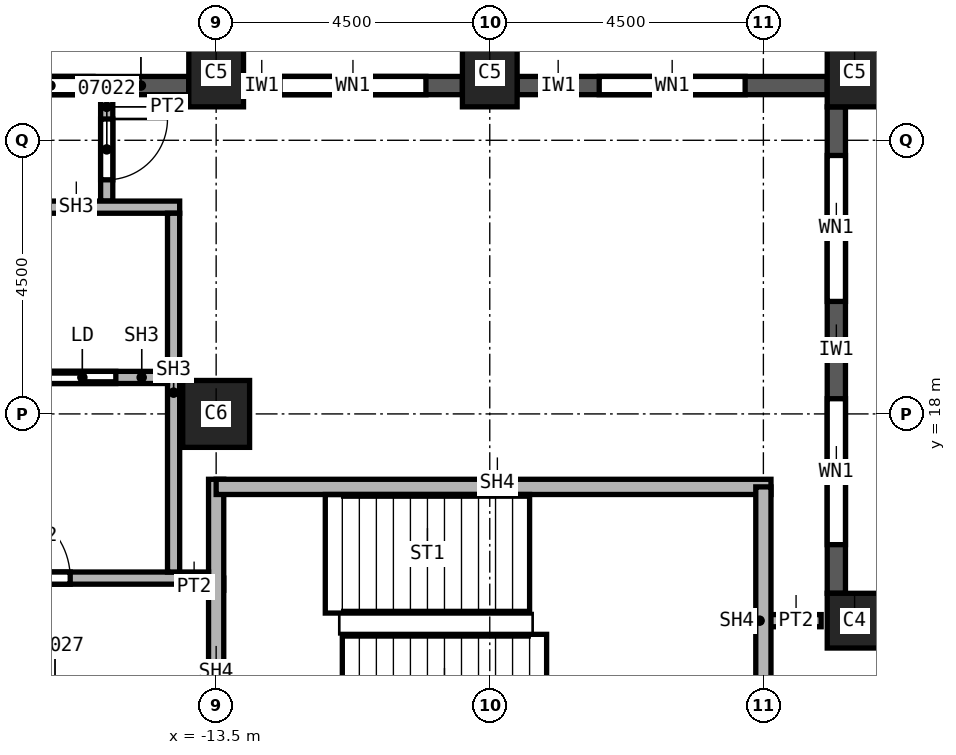
"""IFC4 building model, lengths in metres.
Left out: names, types, materials, properties, quantities, classifications, styles, units other than length and angle.
Written with IfcOpenShell. Run it as: python <this file> out.ifc"""

import sys

from ifc_helpers import new_model, si_unit, direction, frame, frame_2d, origin, origin_2d, place, context, subcontext, project, spatial, rectangle, extrude, element, fill, save


model = new_model("IFC4")
c1 = context("Model", 3, precision=1e-05, world=origin(), true_north=direction((0.0, 1.0)))
c2 = subcontext(c1, "Body", "Model", "MODEL_VIEW")
j1 = project(units=[si_unit("LENGTHUNIT", "METRE"), si_unit("PLANEANGLEUNIT", "RADIAN")], contexts=[c1])
p1 = place(None, origin())
s1 = spatial("IfcSite", under=j1, at=p1, CompositionType="ELEMENT")
p2 = place(p1, origin())
s2 = spatial("IfcBuilding", under=s1, at=p2, CompositionType="ELEMENT")
p3 = place(p2, frame((0.0, 0.0, 138.0)))
s3 = spatial("IfcBuildingStorey", under=s2, at=p3, CompositionType="ELEMENT", Elevation=138.0)
p4 = place(p3, frame((-13.5, 18.0, 0.0), z_axis=(0.0, 0.0, 1.0), x_axis=(1.0, 0.0, 0.0)))
e1 = element("IfcColumn", 1, at=p4, inside=s3, PredefinedType="COLUMN", context=c2, shape_type="SweptSolid", body=[
    extrude(rectangle(XDim=1.1, YDim=1.1, at=origin_2d()), origin(), (0.0, 0.0, 1.0), 3.7),
])
for number, where, z_axis, x_axis in (
    (2, (-3.0, 23.6, 0.0), (0.0, 0.0, 1.0), (1.0, 0.0, 0.0)),
    (3, (-9.0, 23.6, 0.0), (0.0, 0.0, 1.0), (1.0, 0.0, 0.0)),
    (4, (-13.5, 23.6, 0.0), (0.0, 0.0, 1.0), (1.0, 0.0, 0.0)),
):
    element("IfcColumn", number, at=place(p3, frame(where, z_axis=z_axis, x_axis=x_axis)), inside=s3, PredefinedType="COLUMN", context=c2, shape_type="SweptSolid", body=[
        extrude(rectangle(XDim=0.9, YDim=1.1, at=origin_2d()), origin(), (0.0, 0.0, 1.0), 3.7),
    ])
p5 = place(p3, frame((-3.0, 14.6, 0.0), z_axis=(0.0, 0.0, 1.0), x_axis=(1.0, 0.0, 0.0)))
e5 = element("IfcColumn", 5, at=p5, inside=s3, PredefinedType="COLUMN", context=c2, shape_type="SweptSolid", body=[
    extrude(rectangle(XDim=0.9, YDim=0.9, at=origin_2d()), origin(), (0.0, 0.0, 1.0), 3.7),
])
p6 = place(p3, frame((-3.3, 15.05, 0.0), z_axis=(0.0, 0.0, 1.0), x_axis=(0.0, 1.0, 0.0)))
e6 = element("IfcWall", 6, at=p6, inside=s3, PredefinedType="SOLIDWALL", context=c2, shape_type="SweptSolid", body=[
    extrude(rectangle(XDim=8.0, YDim=0.3, at=frame_2d((4.0, 0.0))), origin(), (0.0, 0.0, 1.0), 3.1),
])
p7 = place(p6, frame((0.8, 0.0, 0.8)))
e7 = element("IfcOpeningElement", 7, at=p7, cuts=e6, PredefinedType="OPENING", context=c2, shape_type="SweptSolid", body=[
    extrude(rectangle(XDim=2.4, YDim=1.95, at=frame_2d((1.2, 0.975))), frame((0.0, 0.15, 0.0), z_axis=(0.0, -1.0, 0.0), x_axis=(1.0, 0.0, 0.0)), (0.0, 0.0, 1.0), 0.3),
])
p8 = place(p6, frame((4.8, 0.0, 0.8)))
e8 = element("IfcOpeningElement", 8, at=p8, cuts=e6, PredefinedType="OPENING", context=c2, shape_type="SweptSolid", body=[
    extrude(rectangle(XDim=2.4, YDim=1.95, at=frame_2d((1.2, 0.975))), frame((0.0, 0.15, 0.0), z_axis=(0.0, -1.0, 0.0), x_axis=(1.0, 0.0, 0.0)), (0.0, 0.0, 1.0), 0.3),
])
p9 = place(p3, frame((-3.45, 23.4, 0.0), z_axis=(0.0, 0.0, 1.0), x_axis=(-1.0, 0.0, 0.0)))
e9 = element("IfcWall", 9, at=p9, inside=s3, PredefinedType="SOLIDWALL", context=c2, shape_type="SweptSolid", body=[
    extrude(rectangle(XDim=5.1, YDim=0.3, at=frame_2d((2.55, 0.0))), origin(), (0.0, 0.0, 1.0), 3.1),
])
p10 = place(p9, frame((1.35, 0.0, 0.8)))
e10 = element("IfcOpeningElement", 10, at=p10, cuts=e9, PredefinedType="OPENING", context=c2, shape_type="SweptSolid", body=[
    extrude(rectangle(XDim=2.4, YDim=1.95, at=frame_2d((1.2, 0.975))), frame((0.0, 0.15, 0.0), z_axis=(0.0, -1.0, 0.0), x_axis=(1.0, 0.0, 0.0)), (0.0, 0.0, 1.0), 0.3),
])
p11 = place(p3, frame((-9.45, 23.4, 0.0), z_axis=(0.0, 0.0, 1.0), x_axis=(-1.0, 0.0, 0.0)))
e11 = element("IfcWall", 11, at=p11, inside=s3, PredefinedType="SOLIDWALL", context=c2, shape_type="SweptSolid", body=[
    extrude(rectangle(XDim=3.6, YDim=0.3, at=frame_2d((1.8, 0.0))), origin(), (0.0, 0.0, 1.0), 3.1),
])
p12 = place(p11, frame((0.6, 0.0, 0.8)))
e12 = element("IfcOpeningElement", 12, at=p12, cuts=e11, PredefinedType="OPENING", context=c2, shape_type="SweptSolid", body=[
    extrude(rectangle(XDim=2.4, YDim=1.95, at=frame_2d((1.2, 0.975))), frame((0.0, 0.15, 0.0), z_axis=(0.0, -1.0, 0.0), x_axis=(1.0, 0.0, 0.0)), (0.0, 0.0, 1.0), 0.3),
])
p13 = place(p3, frame((-13.95, 23.4, 0.0), z_axis=(0.0, 0.0, 1.0), x_axis=(-1.0, 0.0, 0.0)))
e13 = element("IfcWall", 13, at=p13, inside=s3, PredefinedType="SOLIDWALL", context=c2, shape_type="SweptSolid", body=[
    extrude(rectangle(XDim=3.6, YDim=0.3, at=frame_2d((1.8, 0.0))), origin(), (0.0, 0.0, 1.0), 3.1),
])
p14 = place(p13, frame((1.575, 0.0, 0.8)))
e14 = element("IfcOpeningElement", 14, at=p14, cuts=e13, PredefinedType="OPENING", context=c2, shape_type="SweptSolid", body=[
    extrude(rectangle(XDim=1.4, YDim=1.95, at=frame_2d((0.7, 0.975))), frame((0.0, 0.15, 0.0), z_axis=(0.0, -1.0, 0.0), x_axis=(1.0, 0.0, 0.0)), (0.0, 0.0, 1.0), 0.3),
])
p15 = place(p3, frame((-15.3, 23.25, 0.0), z_axis=(0.0, 0.0, 1.0), x_axis=(0.0, -1.0, 0.0)))
e15 = element("IfcWall", 15, at=p15, inside=s3, PredefinedType="PARTITIONING", context=c2, shape_type="SweptSolid", body=[
    extrude(rectangle(XDim=1.75, YDim=0.2, at=frame_2d((0.875, 0.0))), origin(), (0.0, 0.0, 1.0), 3.7),
])
p16 = place(p15, frame((0.4, 0.0, 0.0)))
e16 = element("IfcOpeningElement", 16, at=p16, cuts=e15, PredefinedType="OPENING", context=c2, shape_type="SweptSolid", body=[
    extrude(rectangle(XDim=1.0, YDim=2.1, at=frame_2d((0.5, 1.05))), frame((0.0, 0.1, 0.0), z_axis=(0.0, -1.0, 0.0), x_axis=(1.0, 0.0, 0.0)), (0.0, 0.0, 1.0), 0.2),
])
p17 = place(p3, frame((-14.1, 15.2, 0.0), z_axis=(0.0, 0.0, 1.0), x_axis=(1.0, 0.0, 0.0)))
e17 = element("IfcWall", 17, at=p17, inside=s3, PredefinedType="PARTITIONING", context=c2, shape_type="SweptSolid", body=[
    extrude(rectangle(XDim=0.725, YDim=0.2, at=frame_2d((0.363, 0.0))), origin(), (0.0, 0.0, 1.0), 3.7),
])
p18 = place(p3, frame((-4.5, 14.6, 0.0), z_axis=(0.0, 0.0, 1.0), x_axis=(1.0, 0.0, 0.0)))
e18 = element("IfcWall", 18, at=p18, inside=s3, PredefinedType="PARTITIONING", context=c2, shape_type="SweptSolid", body=[
    extrude(rectangle(XDim=0.95, YDim=0.2, at=frame_2d((0.475, 0.0))), origin(), (0.0, 0.0, 1.0), 3.7),
])
p19 = place(p3, frame((-13.5, 12.175, 0.0), z_axis=(0.0, 0.0, 1.0), x_axis=(0.0, 1.0, 0.0)))
e19 = element("IfcWall", 19, at=p19, inside=s3, PredefinedType="SOLIDWALL", context=c2, shape_type="SweptSolid", body=[
    extrude(rectangle(XDim=4.75, YDim=0.25, at=frame_2d((2.375, 0.0))), origin(), (0.0, 0.0, 1.0), 3.7),
])
p20 = place(p3, frame((-13.5, 16.8, 0.0), z_axis=(0.0, 0.0, 1.0), x_axis=(1.0, 0.0, 0.0)))
e20 = element("IfcWall", 20, at=p20, inside=s3, PredefinedType="SOLIDWALL", context=c2, shape_type="SweptSolid", body=[
    extrude(rectangle(XDim=9.125, YDim=0.25, at=frame_2d((4.562, 0.0))), origin(), (0.0, 0.0, 1.0), 3.7),
])
p21 = place(p3, frame((-4.5, 16.8, 0.0), z_axis=(0.0, 0.0, 1.0), x_axis=(0.0, -1.0, 0.0)))
e21 = element("IfcWall", 21, at=p21, inside=s3, PredefinedType="SOLIDWALL", context=c2, shape_type="SweptSolid", body=[
    extrude(rectangle(XDim=4.5, YDim=0.25, at=frame_2d((2.25, 0.0))), origin(), (0.0, 0.0, 1.0), 3.7),
])
p22 = place(p3, frame((-21.9, 15.3, 0.0), z_axis=(0.0, 0.0, 1.0), x_axis=(1.0, 0.0, 0.0)))
e22 = element("IfcWall", 22, at=p22, inside=s3, PredefinedType="SOLIDWALL", context=c2, shape_type="SweptSolid", body=[
    extrude(rectangle(XDim=8.275, YDim=0.2, at=frame_2d((4.137, 0.0))), origin(), (0.0, 0.0, 1.0), 3.7),
])
p23 = place(p22, frame((4.8, 0.0, 0.0)))
e23 = element("IfcOpeningElement", 23, at=p23, cuts=e22, PredefinedType="OPENING", context=c2, shape_type="SweptSolid", body=[
    extrude(rectangle(XDim=1.2, YDim=2.1, at=frame_2d((0.6, 1.05))), frame((0.0, 0.1, 0.0), z_axis=(0.0, -1.0, 0.0), x_axis=(1.0, 0.0, 0.0)), (0.0, 0.0, 1.0), 0.2),
])
p24 = place(p3, frame((-21.9, 21.4, 0.0), z_axis=(0.0, 0.0, 1.0), x_axis=(1.0, 0.0, 0.0)))
e24 = element("IfcWall", 24, at=p24, inside=s3, PredefinedType="SOLIDWALL", context=c2, shape_type="SweptSolid", body=[
    extrude(rectangle(XDim=7.8, YDim=0.2, at=frame_2d((3.9, 0.0))), origin(), (0.0, 0.0, 1.0), 3.7),
])
p25 = place(p24, frame((3.2, 0.0, 0.0)))
e25 = element("IfcOpeningElement", 25, at=p25, cuts=e24, PredefinedType="OPENING", context=c2, shape_type="SweptSolid", body=[
    extrude(rectangle(XDim=1.2, YDim=2.1, at=frame_2d((0.6, 1.05))), frame((0.0, 0.1, 0.0), z_axis=(0.0, -1.0, 0.0), x_axis=(1.0, 0.0, 0.0)), (0.0, 0.0, 1.0), 0.2),
])
p26 = place(p3, frame((-14.2, 15.4, 0.0), z_axis=(0.0, 0.0, 1.0), x_axis=(0.0, 1.0, 0.0)))
e26 = element("IfcWall", 26, at=p26, inside=s3, PredefinedType="SOLIDWALL", context=c2, shape_type="SweptSolid", body=[
    extrude(rectangle(XDim=5.9, YDim=0.2, at=frame_2d((2.95, 0.0))), origin(), (0.0, 0.0, 1.0), 3.7),
])
p27 = place(p3, frame((-17.1, 18.6, 0.0), z_axis=(0.0, 0.0, 1.0), x_axis=(1.0, 0.0, 0.0)))
e27 = element("IfcWall", 27, at=p27, inside=s3, PredefinedType="SOLIDWALL", context=c2, shape_type="SweptSolid", body=[
    extrude(rectangle(XDim=2.8, YDim=0.2, at=frame_2d((1.4, 0.0))), origin(), (0.0, 0.0, 1.0), 3.7),
])
p28 = place(p27, frame((0.85, 0.0, 0.0)))
e28 = element("IfcOpeningElement", 28, at=p28, cuts=e27, PredefinedType="OPENING", context=c2, shape_type="SweptSolid", body=[
    extrude(rectangle(XDim=1.1, YDim=2.1, at=frame_2d((0.55, 1.05))), frame((0.0, 0.1, 0.0), z_axis=(0.0, -1.0, 0.0), x_axis=(1.0, 0.0, 0.0)), (0.0, 0.0, 1.0), 0.2),
])
p29 = place(p7, origin())
e29 = element("IfcWindow", 29, at=p29, inside=s3, PartitioningType="SINGLE_PANEL", PredefinedType="WINDOW", context=c2, shape_type="SweptSolid", body=[
    extrude(rectangle(XDim=2.4, YDim=1.95, at=frame_2d((1.2, 0.975))), frame((0.0, 0.03, 0.0), z_axis=(0.0, -1.0, 0.0), x_axis=(1.0, 0.0, 0.0)), (0.0, 0.0, 1.0), 0.06),
])
fill(e7, e29)
p30 = place(p8, origin())
e30 = element("IfcWindow", 30, at=p30, inside=s3, PartitioningType="SINGLE_PANEL", PredefinedType="WINDOW", context=c2, shape_type="SweptSolid", body=[
    extrude(rectangle(XDim=2.4, YDim=1.95, at=frame_2d((1.2, 0.975))), frame((0.0, 0.03, 0.0), z_axis=(0.0, -1.0, 0.0), x_axis=(1.0, 0.0, 0.0)), (0.0, 0.0, 1.0), 0.06),
])
fill(e8, e30)
p31 = place(p10, origin())
e31 = element("IfcWindow", 31, at=p31, inside=s3, PartitioningType="SINGLE_PANEL", PredefinedType="WINDOW", context=c2, shape_type="SweptSolid", body=[
    extrude(rectangle(XDim=2.4, YDim=1.95, at=frame_2d((1.2, 0.975))), frame((0.0, 0.03, 0.0), z_axis=(0.0, -1.0, 0.0), x_axis=(1.0, 0.0, 0.0)), (0.0, 0.0, 1.0), 0.06),
])
fill(e10, e31)
p32 = place(p12, origin())
e32 = element("IfcWindow", 32, at=p32, inside=s3, PartitioningType="SINGLE_PANEL", PredefinedType="WINDOW", context=c2, shape_type="SweptSolid", body=[
    extrude(rectangle(XDim=2.4, YDim=1.95, at=frame_2d((1.2, 0.975))), frame((0.0, 0.03, 0.0), z_axis=(0.0, -1.0, 0.0), x_axis=(1.0, 0.0, 0.0)), (0.0, 0.0, 1.0), 0.06),
])
fill(e12, e32)
p33 = place(p16, origin())
e33 = element("IfcDoor", 33, at=p33, inside=s3, OperationType="SINGLE_SWING_LEFT", PredefinedType="DOOR", context=c2, shape_type="SweptSolid", body=[
    extrude(rectangle(XDim=1.0, YDim=2.1, at=frame_2d((0.5, 1.05))), frame((0.0, 0.025, 0.0), z_axis=(0.0, -1.0, 0.0), x_axis=(1.0, 0.0, 0.0)), (0.0, 0.0, 1.0), 0.05),
])
fill(e16, e33)
p34 = place(p28, origin())
e34 = element("IfcDoor", 34, at=p34, inside=s3, OperationType="SLIDING_TO_LEFT", PredefinedType="DOOR", context=c2, shape_type="SweptSolid", body=[
    extrude(rectangle(XDim=1.1, YDim=2.1, at=frame_2d((0.55, 1.05))), frame((0.0, 0.025, 0.0), z_axis=(0.0, -1.0, 0.0), x_axis=(1.0, 0.0, 0.0)), (0.0, 0.0, 1.0), 0.05),
])
fill(e28, e34)
p35 = place(p23, origin())
e35 = element("IfcDoor", 35, at=p35, inside=s3, OperationType="SINGLE_SWING_RIGHT", PredefinedType="DOOR", context=c2, shape_type="SweptSolid", body=[
    extrude(rectangle(XDim=1.2, YDim=2.1, at=frame_2d((0.6, 1.05))), frame((0.0, 0.025, 0.0), z_axis=(0.0, -1.0, 0.0), x_axis=(1.0, 0.0, 0.0)), (0.0, 0.0, 1.0), 0.05),
])
fill(e23, e35)
p36 = place(p14, origin())
e36 = element("IfcWindow", 36, at=p36, inside=s3, PartitioningType="SINGLE_PANEL", PredefinedType="WINDOW", context=c2, shape_type="SweptSolid", body=[
    extrude(rectangle(XDim=1.4, YDim=1.95, at=frame_2d((0.7, 0.975))), frame((0.0, 0.03, 0.0), z_axis=(0.0, -1.0, 0.0), x_axis=(1.0, 0.0, 0.0)), (0.0, 0.0, 1.0), 0.06),
])
fill(e14, e36)
save(model, sys.argv[1])
